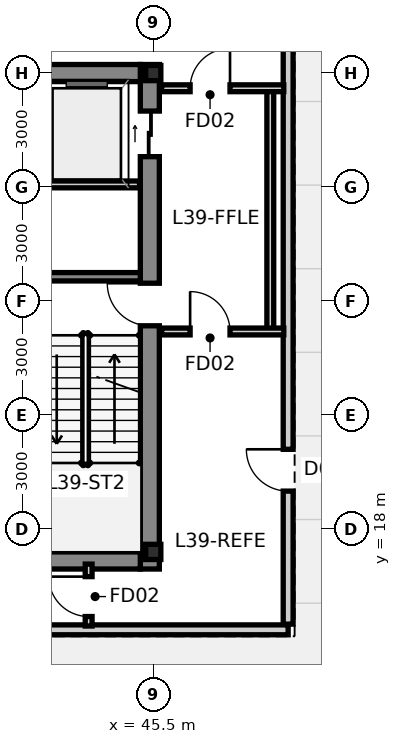
"""IFC4 building model, lengths in metres.
Left out: names, types, materials, properties, quantities, classifications, styles, units other than length and angle.
Written with IfcOpenShell. Run it as: python <this file> out.ifc"""

import sys

from ifc_helpers import new_model, si_unit, direction, frame, frame_2d, origin, origin_2d, place, context, subcontext, project, spatial, rectangle, i_section, extrude, source, transform, mapped, element, fill, save


model = new_model("IFC4")
c1 = context("Model", 3, precision=1e-05, world=origin(), true_north=direction((0.0, 1.0)))
c2 = subcontext(c1, "Body", "Model", "MODEL_VIEW")
j1 = project(units=[si_unit("LENGTHUNIT", "METRE"), si_unit("PLANEANGLEUNIT", "RADIAN")], contexts=[c1])
p1 = place(None, origin())
s1 = spatial("IfcSite", under=j1, at=p1, CompositionType="ELEMENT")
p2 = place(p1, origin())
s2 = spatial("IfcBuilding", under=s1, at=p2, CompositionType="ELEMENT")
p3 = place(p2, frame((0.0, 0.0, 150.05)))
s3 = spatial("IfcBuildingStorey", under=s2, at=p3, CompositionType="ELEMENT", Elevation=150.05)
m1 = source(origin(), c2, "Body", "SweptSolid", [
    extrude(i_section(OverallWidth=0.4, OverallDepth=0.4, WebThickness=0.02, FlangeThickness=0.032, at=origin_2d()), origin(), (0.0, 0.0, 1.0), 4.8),
])
for number, where, z_axis, x_axis in (
    (1, (45.5, 17.4, 0.0), (0.0, 0.0, 1.0), (1.0, 0.0, 0.0)),
    (2, (45.5, 30.0, 0.0), (0.0, 0.0, 1.0), (1.0, 0.0, 0.0)),
):
    element("IfcColumn", number, at=place(p3, frame(where, z_axis=z_axis, x_axis=x_axis)), inside=s3, PredefinedType="COLUMN", context=c2, shape_type="MappedRepresentation", body=[
        mapped(m1, transform((0.0, 0.0, 0.0), scale=1.0)),
    ])
p4 = place(p3, frame((45.41, 16.95, 0.0), z_axis=(0.0, 0.0, 1.0), x_axis=(0.0, 1.0, 0.0)))
e3 = element("IfcWall", 3, at=p4, inside=s3, PredefinedType="SHEAR", context=c2, shape_type="SweptSolid", body=[
    extrude(rectangle(XDim=13.275, YDim=0.5, at=frame_2d((6.638, 0.0))), origin(), (0.0, 0.0, 1.0), 4.8),
])
p5 = place(p4, frame((6.4, 0.0, 0.0)))
e4 = element("IfcOpeningElement", 4, at=p5, cuts=e3, PredefinedType="OPENING", context=c2, shape_type="SweptSolid", body=[
    extrude(rectangle(XDim=1.12, YDim=2.15, at=frame_2d((0.56, 1.075))), frame((0.0, 0.262, 0.0), z_axis=(0.0, -1.0, 0.0), x_axis=(1.0, 0.0, 0.0)), (0.0, 0.0, 1.0), 0.524),
])
p6 = place(p4, frame((10.85, 0.0, 0.0)))
e5 = element("IfcOpeningElement", 5, at=p6, cuts=e3, PredefinedType="OPENING", context=c2, shape_type="SweptSolid", body=[
    extrude(rectangle(XDim=1.2, YDim=2.2, at=frame_2d((0.6, 1.1))), frame((0.0, 0.262, 0.0), z_axis=(0.0, -1.0, 0.0), x_axis=(1.0, 0.0, 0.0)), (0.0, 0.0, 1.0), 0.524),
])
for number, where, z_axis, x_axis in (
    (6, (42.26, 17.175, 0.0), (0.0, 0.0, 1.0), (1.0, 0.0, 0.0)),
    (7, (42.26, 30.0, 0.0), (0.0, 0.0, 1.0), (1.0, 0.0, 0.0)),
):
    element("IfcWall", number, at=place(p3, frame(where, z_axis=z_axis, x_axis=x_axis)), inside=s3, PredefinedType="SHEAR", context=c2, shape_type="SweptSolid", body=[
        extrude(rectangle(XDim=2.9, YDim=0.45, at=frame_2d((1.45, 0.0))), origin(), (0.0, 0.0, 1.0), 4.8),
    ])
p7 = place(p3, frame((42.26, 24.64, 0.0), z_axis=(0.0, 0.0, 1.0), x_axis=(1.0, 0.0, 0.0)))
e8 = element("IfcWall", 8, at=p7, inside=s3, PredefinedType="SHEAR", context=c2, shape_type="SweptSolid", body=[
    extrude(rectangle(XDim=2.9, YDim=0.22, at=frame_2d((1.45, 0.0))), origin(), (0.0, 0.0, 1.0), 4.8),
])
p8 = place(p3, frame((26.95, 15.35, 0.0), z_axis=(0.0, 0.0, 1.0), x_axis=(1.0, 0.0, 0.0)))
e9 = element("IfcWall", 9, at=p8, inside=s3, PredefinedType="STANDARD", context=c2, shape_type="SweptSolid", body=[
    extrude(rectangle(XDim=22.1, YDim=0.26, at=frame_2d((11.05, 0.0))), origin(), (0.0, 0.0, 1.0), 4.55),
])
p9 = place(p3, frame((49.05, 15.5, 0.0), z_axis=(0.0, 0.0, 1.0), x_axis=(0.0, 1.0, 0.0)))
e10 = element("IfcWall", 10, at=p9, inside=s3, PredefinedType="STANDARD", context=c2, shape_type="SweptSolid", body=[
    extrude(rectangle(XDim=17.0, YDim=0.26, at=frame_2d((8.5, 0.0))), origin(), (0.0, 0.0, 1.0), 4.228),
])
p10 = place(p9, frame((3.5, 0.0, 0.0)))
e11 = element("IfcOpeningElement", 11, at=p10, cuts=e10, PredefinedType="OPENING", context=c2, shape_type="SweptSolid", body=[
    extrude(rectangle(XDim=1.1, YDim=2.2, at=frame_2d((0.55, 1.1))), frame((0.0, 0.142, 0.0), z_axis=(0.0, -1.0, 0.0), x_axis=(1.0, 0.0, 0.0)), (0.0, 0.0, 1.0), 0.284),
])
p11 = place(p3, frame((48.58, 23.2, 0.0), z_axis=(0.0, 0.0, 1.0), x_axis=(0.0, 1.0, 0.0)))
e12 = element("IfcWall", 12, at=p11, inside=s3, PredefinedType="PARTITIONING", context=c2, shape_type="SweptSolid", body=[
    extrude(rectangle(XDim=6.4, YDim=0.18, at=frame_2d((3.2, 0.0))), origin(), (0.0, 0.0, 1.0), 4.228),
])
p12 = place(p3, frame((45.72, 23.2, 0.0), z_axis=(0.0, 0.0, 1.0), x_axis=(1.0, 0.0, 0.0)))
e13 = element("IfcWall", 13, at=p12, inside=s3, PredefinedType="PARTITIONING", context=c2, shape_type="SweptSolid", body=[
    extrude(rectangle(XDim=3.215, YDim=0.18, at=frame_2d((1.607, 0.0))), origin(), (0.0, 0.0, 1.0), 4.55),
])
p13 = place(p12, frame((0.75, 0.0, 0.0)))
e14 = element("IfcOpeningElement", 14, at=p13, cuts=e13, PredefinedType="OPENING", context=c2, shape_type="SweptSolid", body=[
    extrude(rectangle(XDim=1.05, YDim=2.15, at=frame_2d((0.525, 1.075))), frame((0.0, 0.102, 0.0), z_axis=(0.0, -1.0, 0.0), x_axis=(1.0, 0.0, 0.0)), (0.0, 0.0, 1.0), 0.204),
])
p14 = place(p3, frame((45.72, 29.6, 0.0), z_axis=(0.0, 0.0, 1.0), x_axis=(1.0, 0.0, 0.0)))
e15 = element("IfcWall", 15, at=p14, inside=s3, PredefinedType="PARTITIONING", context=c2, shape_type="SweptSolid", body=[
    extrude(rectangle(XDim=3.215, YDim=0.18, at=frame_2d((1.607, 0.0))), origin(), (0.0, 0.0, 1.0), 4.074),
])
p15 = place(p14, frame((0.75, 0.0, 0.0)))
e16 = element("IfcOpeningElement", 16, at=p15, cuts=e15, PredefinedType="OPENING", context=c2, shape_type="SweptSolid", body=[
    extrude(rectangle(XDim=1.05, YDim=2.15, at=frame_2d((0.525, 1.075))), frame((0.0, 0.102, 0.0), z_axis=(0.0, -1.0, 0.0), x_axis=(1.0, 0.0, 0.0)), (0.0, 0.0, 1.0), 0.204),
])
p16 = place(p3, frame((42.24, 27.07, 0.0), z_axis=(0.0, 0.0, 1.0), x_axis=(1.0, 0.0, 0.0)))
e17 = element("IfcWall", 17, at=p16, inside=s3, PredefinedType="PARTITIONING", context=c2, shape_type="SweptSolid", body=[
    extrude(rectangle(XDim=2.9, YDim=0.18, at=frame_2d((1.45, 0.0))), origin(), (0.0, 0.0, 1.0), 4.55),
])
p17 = place(p3, frame((43.8, 15.45, 0.0), z_axis=(0.0, 0.0, 1.0), x_axis=(0.0, 1.0, 0.0)))
e18 = element("IfcWall", 18, at=p17, inside=s3, PredefinedType="PARTITIONING", context=c2, shape_type="SweptSolid", body=[
    extrude(rectangle(XDim=1.63, YDim=0.18, at=frame_2d((0.815, 0.0))), origin(), (0.0, 0.0, 1.0), 4.55),
])
p18 = place(p17, frame((0.25, 0.0, 0.0)))
e19 = element("IfcOpeningElement", 19, at=p18, cuts=e18, PredefinedType="OPENING", context=c2, shape_type="SweptSolid", body=[
    extrude(rectangle(XDim=1.05, YDim=2.15, at=frame_2d((0.525, 1.075))), frame((0.0, 0.102, 0.0), z_axis=(0.0, -1.0, 0.0), x_axis=(1.0, 0.0, 0.0)), (0.0, 0.0, 1.0), 0.204),
])
p19 = place(p10, origin())
e20 = element("IfcDoor", 20, at=p19, inside=s3, OperationType="SINGLE_SWING_RIGHT", PredefinedType="DOOR", context=c2, shape_type="SweptSolid", body=[
    extrude(rectangle(XDim=1.1, YDim=2.2, at=frame_2d((0.55, 1.1))), frame((0.0, 0.025, 0.0), z_axis=(0.0, -1.0, 0.0), x_axis=(1.0, 0.0, 0.0)), (0.0, 0.0, 1.0), 0.05),
])
fill(e11, e20)
p20 = place(p5, origin())
e21 = element("IfcDoor", 21, at=p20, inside=s3, OperationType="SINGLE_SWING_RIGHT", PredefinedType="DOOR", context=c2, shape_type="SweptSolid", body=[
    extrude(rectangle(XDim=1.12, YDim=2.15, at=frame_2d((0.56, 1.075))), frame((0.0, 0.025, 0.0), z_axis=(0.0, -1.0, 0.0), x_axis=(1.0, 0.0, 0.0)), (0.0, 0.0, 1.0), 0.05),
])
fill(e4, e21)
p21 = place(p6, origin())
e22 = element("IfcDoor", 22, at=p21, inside=s3, OperationType="SLIDING_TO_RIGHT", PredefinedType="DOOR", context=c2, shape_type="SweptSolid", body=[
    extrude(rectangle(XDim=1.2, YDim=2.2, at=frame_2d((0.6, 1.1))), frame((0.0, 0.025, 0.0), z_axis=(0.0, -1.0, 0.0), x_axis=(1.0, 0.0, 0.0)), (0.0, 0.0, 1.0), 0.05),
])
fill(e5, e22)
p22 = place(p13, origin())
e23 = element("IfcDoor", 23, at=p22, inside=s3, OperationType="SINGLE_SWING_LEFT", PredefinedType="DOOR", context=c2, shape_type="SweptSolid", body=[
    extrude(rectangle(XDim=1.05, YDim=2.15, at=frame_2d((0.525, 1.075))), frame((0.0, 0.025, 0.0), z_axis=(0.0, -1.0, 0.0), x_axis=(1.0, 0.0, 0.0)), (0.0, 0.0, 1.0), 0.05),
])
fill(e14, e23)
p23 = place(p15, origin())
e24 = element("IfcDoor", 24, at=p23, inside=s3, OperationType="SINGLE_SWING_RIGHT", PredefinedType="DOOR", context=c2, shape_type="SweptSolid", body=[
    extrude(rectangle(XDim=1.05, YDim=2.15, at=frame_2d((0.525, 1.075))), frame((0.0, 0.025, 0.0), z_axis=(0.0, -1.0, 0.0), x_axis=(1.0, 0.0, 0.0)), (0.0, 0.0, 1.0), 0.05),
])
fill(e16, e24)
p24 = place(p18, origin())
e25 = element("IfcDoor", 25, at=p24, inside=s3, OperationType="SINGLE_SWING_RIGHT", PredefinedType="DOOR", context=c2, shape_type="SweptSolid", body=[
    extrude(rectangle(XDim=1.05, YDim=2.15, at=frame_2d((0.525, 1.075))), frame((0.0, 0.025, 0.0), z_axis=(0.0, -1.0, 0.0), x_axis=(1.0, 0.0, 0.0)), (0.0, 0.0, 1.0), 0.05),
])
fill(e19, e25)
save(model, sys.argv[1])
